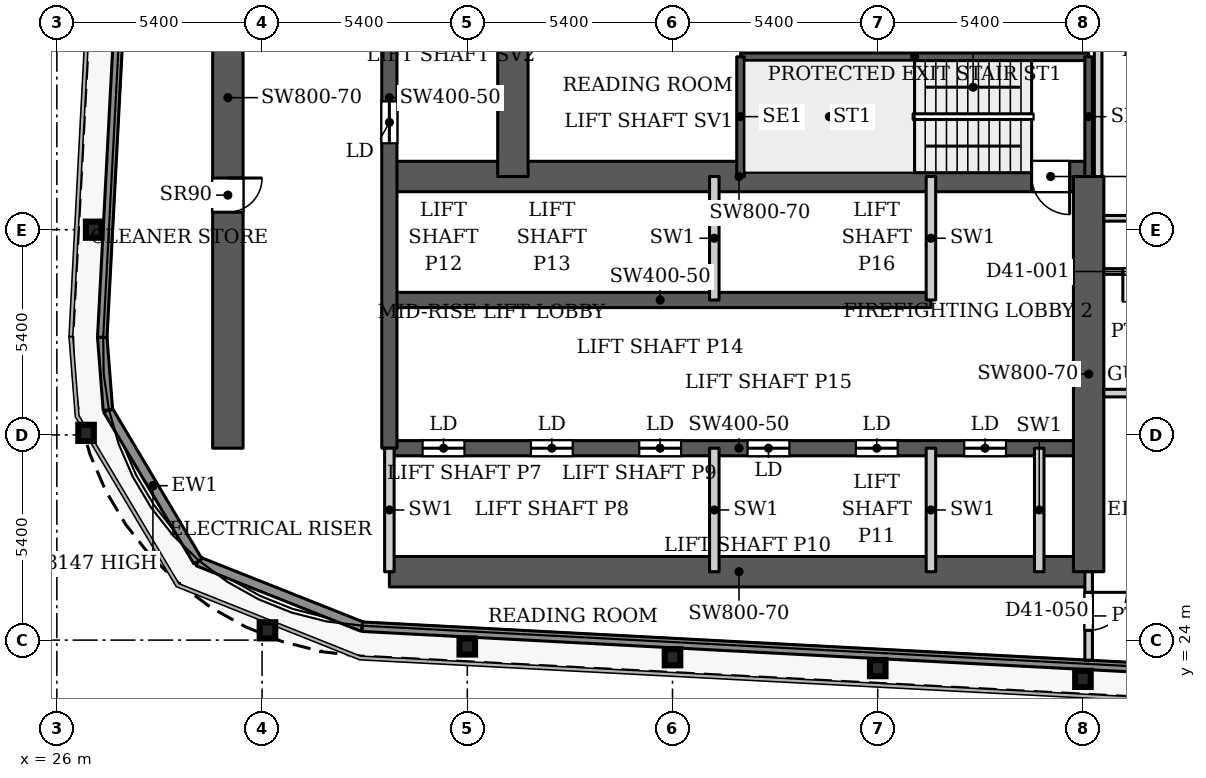
"""IFC4 building model, lengths in metres.
Left out: names, types, materials, properties, quantities, classifications, styles, units other than length and angle.
Written with IfcOpenShell. Run it as: python <this file> out.ifc"""

import sys

from ifc_helpers import new_model, si_unit, direction, frame, frame_2d, origin, origin_2d, place, context, subcontext, project, spatial, rectangle, i_section, extrude, source, transform, mapped, element, fill, save


model = new_model("IFC4")
c1 = context("Model", 3, precision=1e-05, world=origin(), true_north=direction((0.0, 1.0)))
c2 = subcontext(c1, "Body", "Model", "MODEL_VIEW")
j1 = project(units=[si_unit("LENGTHUNIT", "METRE"), si_unit("PLANEANGLEUNIT", "RADIAN")], contexts=[c1])
p1 = place(None, origin())
s1 = spatial("IfcSite", under=j1, at=p1, CompositionType="ELEMENT")
p2 = place(p1, origin())
s2 = spatial("IfcBuilding", under=s1, at=p2, CompositionType="ELEMENT")
p3 = place(p2, frame((0.0, 0.0, 179.9)))
s3 = spatial("IfcBuildingStorey", under=s2, at=p3, CompositionType="ELEMENT", Elevation=179.9)
for number, where, z_axis, x_axis in (
    (1, (53.0, 22.98, 0.0), (0.0, 0.0, 1.0), (1.0, 0.0, 0.0)),
    (2, (47.6, 23.264, 0.0), (0.0, 0.0, 1.0), (1.0, 0.0, 0.0)),
    (3, (42.2, 23.548, 0.0), (0.0, 0.0, 1.0), (1.0, 0.0, 0.0)),
    (4, (36.8, 23.832, 0.0), (0.0, 0.0, 1.0), (1.0, 0.0, 0.0)),
    (5, (31.542, 24.257, 0.0), (0.0, 0.0, 1.0), (1.0, 0.0, 0.0)),
    (6, (26.769, 29.454, 0.0), (0.0, 0.0, 1.0), (1.0, 0.0, 0.0)),
    (7, (26.969, 34.8, 0.0), (0.0, 0.0, 1.0), (1.0, 0.0, 0.0)),
):
    element("IfcColumn", number, at=place(p3, frame(where, z_axis=z_axis, x_axis=x_axis)), inside=s3, PredefinedType="COLUMN", context=c2, shape_type="SweptSolid", body=[
        extrude(i_section(OverallWidth=0.409, OverallDepth=0.425, WebThickness=0.033, FlangeThickness=0.052, FilletRadius=0.013, at=origin_2d()), origin(), (0.0, 0.0, 1.0), 3.9),
    ])
p4 = place(p3, frame((34.75, 25.8, 0.0), z_axis=(0.0, 0.0, 1.0), x_axis=(1.0, 0.0, 0.0)))
e8 = element("IfcWall", 8, at=p4, inside=s3, PredefinedType="SHEAR", context=c2, shape_type="SweptSolid", body=[
    extrude(rectangle(XDim=18.4, YDim=0.8, at=frame_2d((9.2, 0.0))), origin(), (0.0, 0.0, 1.0), 3.9),
])
p5 = place(p3, frame((34.75, 29.05, 0.0), z_axis=(0.0, 0.0, 1.0), x_axis=(1.0, 0.0, 0.0)))
e9 = element("IfcWall", 9, at=p5, inside=s3, PredefinedType="SHEAR", context=c2, shape_type="SweptSolid", body=[
    extrude(rectangle(XDim=18.4, YDim=0.4, at=frame_2d((9.2, 0.0))), origin(), (0.0, 0.0, 1.0), 3.9),
])
p6 = place(p5, frame((0.875, 0.0, 0.0)))
e10 = element("IfcOpeningElement", 10, at=p6, cuts=e9, PredefinedType="OPENING", context=c2, shape_type="SweptSolid", body=[
    extrude(rectangle(XDim=1.1, YDim=2.2, at=frame_2d((0.55, 1.1))), frame((0.0, 0.21, 0.0), z_axis=(0.0, -1.0, 0.0), x_axis=(1.0, 0.0, 0.0)), (0.0, 0.0, 1.0), 0.42),
])
p7 = place(p5, frame((3.725, 0.0, 0.0)))
e11 = element("IfcOpeningElement", 11, at=p7, cuts=e9, PredefinedType="OPENING", context=c2, shape_type="SweptSolid", body=[
    extrude(rectangle(XDim=1.1, YDim=2.2, at=frame_2d((0.55, 1.1))), frame((0.0, 0.21, 0.0), z_axis=(0.0, -1.0, 0.0), x_axis=(1.0, 0.0, 0.0)), (0.0, 0.0, 1.0), 0.42),
])
p8 = place(p5, frame((6.575, 0.0, 0.0)))
e12 = element("IfcOpeningElement", 12, at=p8, cuts=e9, PredefinedType="OPENING", context=c2, shape_type="SweptSolid", body=[
    extrude(rectangle(XDim=1.1, YDim=2.2, at=frame_2d((0.55, 1.1))), frame((0.0, 0.21, 0.0), z_axis=(0.0, -1.0, 0.0), x_axis=(1.0, 0.0, 0.0)), (0.0, 0.0, 1.0), 0.42),
])
p9 = place(p5, frame((9.425, 0.0, 0.0)))
e13 = element("IfcOpeningElement", 13, at=p9, cuts=e9, PredefinedType="OPENING", context=c2, shape_type="SweptSolid", body=[
    extrude(rectangle(XDim=1.1, YDim=2.2, at=frame_2d((0.55, 1.1))), frame((0.0, 0.21, 0.0), z_axis=(0.0, -1.0, 0.0), x_axis=(1.0, 0.0, 0.0)), (0.0, 0.0, 1.0), 0.42),
])
p10 = place(p5, frame((12.275, 0.0, 0.0)))
e14 = element("IfcOpeningElement", 14, at=p10, cuts=e9, PredefinedType="OPENING", context=c2, shape_type="SweptSolid", body=[
    extrude(rectangle(XDim=1.1, YDim=2.2, at=frame_2d((0.55, 1.1))), frame((0.0, 0.21, 0.0), z_axis=(0.0, -1.0, 0.0), x_axis=(1.0, 0.0, 0.0)), (0.0, 0.0, 1.0), 0.42),
])
p11 = place(p5, frame((15.125, 0.0, 0.0)))
e15 = element("IfcOpeningElement", 15, at=p11, cuts=e9, PredefinedType="OPENING", context=c2, shape_type="SweptSolid", body=[
    extrude(rectangle(XDim=1.1, YDim=2.2, at=frame_2d((0.55, 1.1))), frame((0.0, 0.21, 0.0), z_axis=(0.0, -1.0, 0.0), x_axis=(1.0, 0.0, 0.0)), (0.0, 0.0, 1.0), 0.42),
])
p12 = place(p3, frame((34.75, 32.95, 0.0), z_axis=(0.0, 0.0, 1.0), x_axis=(1.0, 0.0, 0.0)))
e16 = element("IfcWall", 16, at=p12, inside=s3, PredefinedType="SHEAR", context=c2, shape_type="SweptSolid", body=[
    extrude(rectangle(XDim=14.25, YDim=0.4, at=frame_2d((7.125, 0.0))), origin(), (0.0, 0.0, 1.0), 3.9),
])
p13 = place(p3, frame((34.75, 36.2, 0.0), z_axis=(0.0, 0.0, 1.0), x_axis=(1.0, 0.0, 0.0)))
e17 = element("IfcWall", 17, at=p13, inside=s3, PredefinedType="SHEAR", context=c2, shape_type="SweptSolid", body=[
    extrude(rectangle(XDim=18.4, YDim=0.8, at=frame_2d((9.2, 0.0))), origin(), (0.0, 0.0, 1.0), 3.9),
])
p14 = place(p13, frame((16.9, 0.0, 0.0)))
e18 = element("IfcOpeningElement", 18, at=p14, cuts=e17, PredefinedType="OPENING", context=c2, shape_type="SweptSolid", body=[
    extrude(rectangle(XDim=1.0, YDim=2.2, at=frame_2d((0.5, 1.1))), frame((0.0, 0.41, 0.0), z_axis=(0.0, -1.0, 0.0), x_axis=(1.0, 0.0, 0.0)), (0.0, 0.0, 1.0), 0.82),
])
p15 = place(p3, frame((34.75, 29.05, 0.0), z_axis=(0.0, 0.0, 1.0), x_axis=(0.0, 1.0, 0.0)))
e19 = element("IfcWall", 19, at=p15, inside=s3, PredefinedType="SHEAR", context=c2, shape_type="SweptSolid", body=[
    extrude(rectangle(XDim=18.45, YDim=0.4, at=frame_2d((9.225, 0.0))), origin(), (0.0, 0.0, 1.0), 3.9),
])
p16 = place(p15, frame((8.025, 0.0, 0.0)))
e20 = element("IfcOpeningElement", 20, at=p16, cuts=e19, PredefinedType="OPENING", context=c2, shape_type="SweptSolid", body=[
    extrude(rectangle(XDim=1.1, YDim=2.2, at=frame_2d((0.55, 1.1))), frame((0.0, 0.21, 0.0), z_axis=(0.0, -1.0, 0.0), x_axis=(1.0, 0.0, 0.0)), (0.0, 0.0, 1.0), 0.42),
])
p17 = place(p15, frame((10.875, 0.0, 0.0)))
e21 = element("IfcOpeningElement", 21, at=p17, cuts=e19, PredefinedType="OPENING", context=c2, shape_type="SweptSolid", body=[
    extrude(rectangle(XDim=1.1, YDim=2.2, at=frame_2d((0.55, 1.1))), frame((0.0, 0.21, 0.0), z_axis=(0.0, -1.0, 0.0), x_axis=(1.0, 0.0, 0.0)), (0.0, 0.0, 1.0), 0.42),
])
p18 = place(p15, frame((13.725, 0.0, 0.0)))
e22 = element("IfcOpeningElement", 22, at=p18, cuts=e19, PredefinedType="OPENING", context=c2, shape_type="SweptSolid", body=[
    extrude(rectangle(XDim=1.1, YDim=2.2, at=frame_2d((0.55, 1.1))), frame((0.0, 0.21, 0.0), z_axis=(0.0, -1.0, 0.0), x_axis=(1.0, 0.0, 0.0)), (0.0, 0.0, 1.0), 0.42),
])
p19 = place(p15, frame((15.95, 0.0, 0.0)))
e23 = element("IfcOpeningElement", 23, at=p19, cuts=e19, PredefinedType="OPENING", context=c2, shape_type="SweptSolid", body=[
    extrude(rectangle(XDim=1.1, YDim=2.2, at=frame_2d((0.55, 1.1))), frame((0.0, 0.21, 0.0), z_axis=(0.0, -1.0, 0.0), x_axis=(1.0, 0.0, 0.0)), (0.0, 0.0, 1.0), 0.42),
])
p20 = place(p3, frame((38.0, 36.2, 0.0), z_axis=(0.0, 0.0, 1.0), x_axis=(0.0, 1.0, 0.0)))
e24 = element("IfcWall", 24, at=p20, inside=s3, PredefinedType="SHEAR", context=c2, shape_type="SweptSolid", body=[
    extrude(rectangle(XDim=8.55, YDim=0.8, at=frame_2d((4.275, 0.0))), origin(), (0.0, 0.0, 1.0), 3.9),
])
p21 = place(p3, frame((30.5, 29.05, 0.0), z_axis=(0.0, 0.0, 1.0), x_axis=(0.0, 1.0, 0.0)))
e25 = element("IfcWall", 25, at=p21, inside=s3, PredefinedType="SHEAR", context=c2, shape_type="SweptSolid", body=[
    extrude(rectangle(XDim=18.45, YDim=0.8, at=frame_2d((9.225, 0.0))), origin(), (0.0, 0.0, 1.0), 3.9),
])
p22 = place(p21, frame((6.21, 0.0, 0.0)))
e26 = element("IfcOpeningElement", 26, at=p22, cuts=e25, PredefinedType="OPENING", context=c2, shape_type="SweptSolid", body=[
    extrude(rectangle(XDim=0.9, YDim=2.2, at=frame_2d((0.45, 1.1))), frame((0.0, 0.41, 0.0), z_axis=(0.0, -1.0, 0.0), x_axis=(1.0, 0.0, 0.0)), (0.0, 0.0, 1.0), 0.82),
])
p23 = place(p21, frame((10.684, 0.0, 0.0)))
e27 = element("IfcOpeningElement", 27, at=p23, cuts=e25, PredefinedType="OPENING", context=c2, shape_type="SweptSolid", body=[
    extrude(rectangle(XDim=0.9, YDim=2.2, at=frame_2d((0.45, 1.1))), frame((0.0, 0.41, 0.0), z_axis=(0.0, -1.0, 0.0), x_axis=(1.0, 0.0, 0.0)), (0.0, 0.0, 1.0), 0.82),
])
p24 = place(p3, frame((53.15, 25.8, 0.0), z_axis=(0.0, 0.0, 1.0), x_axis=(0.0, 1.0, 0.0)))
e28 = element("IfcWall", 28, at=p24, inside=s3, PredefinedType="SHEAR", context=c2, shape_type="SweptSolid", body=[
    extrude(rectangle(XDim=10.4, YDim=0.8, at=frame_2d((5.2, 0.0))), origin(), (0.0, 0.0, 1.0), 3.9),
])
p25 = place(p3, frame((34.039, 24.353, 0.0), z_axis=(0.0, 0.0, 1.0), x_axis=(-0.929352825399, 0.369192803184, 0.0)))
e29 = element("IfcWall", 29, at=p25, inside=s3, PredefinedType="SOLIDWALL", context=c2, shape_type="SweptSolid", body=[
    extrude(rectangle(XDim=4.656, YDim=0.25, at=frame_2d((2.328, 0.0))), origin(), (0.0, 0.0, 1.0), 3.75),
])
p26 = place(p3, frame((29.712, 26.072, 0.0), z_axis=(0.0, 0.0, 1.0), x_axis=(-0.511028049012, 0.859564036662, 0.0)))
e30 = element("IfcWall", 30, at=p26, inside=s3, PredefinedType="SOLIDWALL", context=c2, shape_type="SweptSolid", body=[
    extrude(rectangle(XDim=4.634, YDim=0.25, at=frame_2d((2.317, 0.0))), origin(), (0.0, 0.0, 1.0), 3.147),
])
p27 = place(p3, frame((27.344, 30.055, 0.0), z_axis=(0.0, 0.0, 1.0), x_axis=(-0.077571675317, 0.99698677784, 0.0)))
e31 = element("IfcWall", 31, at=p27, inside=s3, PredefinedType="SOLIDWALL", context=c2, shape_type="SweptSolid", body=[
    extrude(rectangle(XDim=1.92, YDim=0.25, at=frame_2d((0.96, 0.0))), origin(), (0.0, 0.0, 1.0), 3.75),
])
p28 = place(p3, frame((27.195, 31.969, 0.0), z_axis=(0.0, 0.0, 1.0), x_axis=(0.052554995867, 0.998618031286, 0.0)))
e32 = element("IfcWall", 32, at=p28, inside=s3, PredefinedType="SOLIDWALL", context=c2, shape_type="SweptSolid", body=[
    extrude(rectangle(XDim=66.787, YDim=0.25, at=frame_2d((33.394, 0.0))), origin(), (0.0, 0.0, 1.0), 3.75),
])
p29 = place(p3, frame((100.586, 20.85, 0.0), z_axis=(0.0, 0.0, 1.0), x_axis=(-0.99861746497, 0.052565755559, 0.0)))
e33 = element("IfcWall", 33, at=p29, inside=s3, PredefinedType="SOLIDWALL", context=c2, shape_type="SweptSolid", body=[
    extrude(rectangle(XDim=66.639, YDim=0.25, at=frame_2d((33.319, 0.0))), origin(), (0.0, 0.0, 1.0), 3.75),
])
p30 = place(p3, frame((43.99, 39.35, 0.0), z_axis=(0.0, 0.0, 1.0), x_axis=(1.0, 0.0, 0.0)))
e34 = element("IfcWall", 34, at=p30, inside=s3, PredefinedType="SHEAR", context=c2, shape_type="SweptSolid", body=[
    extrude(rectangle(XDim=9.16, YDim=0.2, at=frame_2d((4.58, 0.0))), origin(), (0.0, 0.0, 1.0), 3.9),
])
for number, where, z_axis, x_axis in (
    (35, (43.99, 36.2, 0.0), (0.0, 0.0, 1.0), (0.0, 1.0, 0.0)),
    (36, (53.15, 36.2, 0.0), (0.0, 0.0, 1.0), (0.0, 1.0, 0.0)),
):
    element("IfcWall", number, at=place(p3, frame(where, z_axis=z_axis, x_axis=x_axis)), inside=s3, PredefinedType="SHEAR", context=c2, shape_type="SweptSolid", body=[
        extrude(rectangle(XDim=3.15, YDim=0.2, at=frame_2d((1.575, 0.0))), origin(), (0.0, 0.0, 1.0), 3.9),
    ])
for number, where, z_axis, x_axis in (
    (37, (34.75, 25.8, 0.0), (0.0, 0.0, 1.0), (0.0, 1.0, 0.0)),
    (38, (43.3, 25.8, 0.0), (0.0, 0.0, 1.0), (0.0, 1.0, 0.0)),
    (39, (43.3, 32.95, 0.0), (0.0, 0.0, 1.0), (0.0, 1.0, 0.0)),
    (40, (49.0, 25.8, 0.0), (0.0, 0.0, 1.0), (0.0, 1.0, 0.0)),
    (41, (49.0, 32.95, 0.0), (0.0, 0.0, 1.0), (0.0, 1.0, 0.0)),
    (42, (51.85, 25.8, 0.0), (0.0, 0.0, 1.0), (0.0, 1.0, 0.0)),
):
    element("IfcWall", number, at=place(p3, frame(where, z_axis=z_axis, x_axis=x_axis)), inside=s3, PredefinedType="PARTITIONING", context=c2, shape_type="SweptSolid", body=[
        extrude(rectangle(XDim=3.25, YDim=0.25, at=frame_2d((1.625, 0.0))), origin(), (0.0, 0.0, 1.0), 3.9),
    ])
p31 = place(p3, frame((53.15, 23.472, 0.0), z_axis=(0.0, 0.0, 1.0), x_axis=(0.0, 1.0, 0.0)))
e43 = element("IfcWall", 43, at=p31, inside=s3, PredefinedType="PARTITIONING", context=c2, shape_type="SweptSolid", body=[
    extrude(rectangle(XDim=2.328, YDim=0.2, at=frame_2d((1.164, 0.0))), origin(), (0.0, 0.0, 1.0), 3.6),
])
p32 = place(p31, frame((0.785, 0.0, 0.0)))
e44 = element("IfcOpeningElement", 44, at=p32, cuts=e43, PredefinedType="OPENING", context=c2, shape_type="SweptSolid", body=[
    extrude(rectangle(XDim=1.0, YDim=2.1, at=frame_2d((0.5, 1.05))), frame((0.0, 0.11, 0.0), z_axis=(0.0, -1.0, 0.0), x_axis=(1.0, 0.0, 0.0)), (0.0, 0.0, 1.0), 0.22),
])
p33 = place(p3, frame((53.4, 36.199, 0.0), z_axis=(0.0, 0.0, 1.0), x_axis=(0.0, 1.0, 0.0)))
e45 = element("IfcWall", 45, at=p33, inside=s3, PredefinedType="PARTITIONING", context=c2, shape_type="SweptSolid", body=[
    extrude(rectangle(XDim=7.701, YDim=0.2, at=frame_2d((3.851, 0.0))), origin(), (0.0, 0.0, 1.0), 3.6),
])
p34 = place(p3, frame((53.549, 30.5, 0.0), z_axis=(0.0, 0.0, 1.0), x_axis=(1.0, 0.0, 0.0)))
e46 = element("IfcWall", 46, at=p34, inside=s3, PredefinedType="PARTITIONING", context=c2, shape_type="SweptSolid", body=[
    extrude(rectangle(XDim=44.551, YDim=0.2, at=frame_2d((22.275, 0.0))), origin(), (0.0, 0.0, 1.0), 3.6),
])
p35 = place(p34, frame((6.851, 0.0, 0.0)))
e47 = element("IfcOpeningElement", 47, at=p35, cuts=e46, PredefinedType="OPENING", context=c2, shape_type="SweptSolid", body=[
    extrude(rectangle(XDim=1.0, YDim=2.1, at=frame_2d((0.5, 1.05))), frame((0.0, 0.11, 0.0), z_axis=(0.0, -1.0, 0.0), x_axis=(1.0, 0.0, 0.0)), (0.0, 0.0, 1.0), 0.22),
])
p36 = place(p34, frame((13.451, 0.0, 0.0)))
e48 = element("IfcOpeningElement", 48, at=p36, cuts=e46, PredefinedType="OPENING", context=c2, shape_type="SweptSolid", body=[
    extrude(rectangle(XDim=1.0, YDim=2.1, at=frame_2d((0.5, 1.05))), frame((0.0, 0.11, 0.0), z_axis=(0.0, -1.0, 0.0), x_axis=(1.0, 0.0, 0.0)), (0.0, 0.0, 1.0), 0.22),
])
p37 = place(p34, frame((24.701, 0.0, 0.0)))
e49 = element("IfcOpeningElement", 49, at=p37, cuts=e46, PredefinedType="OPENING", context=c2, shape_type="SweptSolid", body=[
    extrude(rectangle(XDim=1.0, YDim=2.1, at=frame_2d((0.5, 1.05))), frame((0.0, 0.11, 0.0), z_axis=(0.0, -1.0, 0.0), x_axis=(1.0, 0.0, 0.0)), (0.0, 0.0, 1.0), 0.22),
])
p38 = place(p34, frame((38.651, 0.0, 0.0)))
e50 = element("IfcOpeningElement", 50, at=p38, cuts=e46, PredefinedType="OPENING", context=c2, shape_type="SweptSolid", body=[
    extrude(rectangle(XDim=1.0, YDim=2.1, at=frame_2d((0.5, 1.05))), frame((0.0, 0.11, 0.0), z_axis=(0.0, -1.0, 0.0), x_axis=(1.0, 0.0, 0.0)), (0.0, 0.0, 1.0), 0.22),
])
p39 = place(p3, frame((53.549, 33.7, 0.0), z_axis=(0.0, 0.0, 1.0), x_axis=(1.0, 0.0, 0.0)))
e51 = element("IfcWall", 51, at=p39, inside=s3, PredefinedType="PARTITIONING", context=c2, shape_type="SweptSolid", body=[
    extrude(rectangle(XDim=6.501, YDim=0.15, at=frame_2d((3.25, 0.0))), origin(), (0.0, 0.0, 1.0), 3.6),
])
p40 = place(p39, frame((0.501, 0.0, 0.0)))
e52 = element("IfcOpeningElement", 52, at=p40, cuts=e51, PredefinedType="OPENING", context=c2, shape_type="SweptSolid", body=[
    extrude(rectangle(XDim=0.8, YDim=2.1, at=frame_2d((0.4, 1.05))), frame((0.0, 0.085, 0.0), z_axis=(0.0, -1.0, 0.0), x_axis=(1.0, 0.0, 0.0)), (0.0, 0.0, 1.0), 0.17),
])
p41 = place(p39, frame((4.501, 0.0, 0.0)))
e53 = element("IfcOpeningElement", 53, at=p41, cuts=e51, PredefinedType="OPENING", context=c2, shape_type="SweptSolid", body=[
    extrude(rectangle(XDim=0.9, YDim=2.1, at=frame_2d((0.45, 1.05))), frame((0.0, 0.085, 0.0), z_axis=(0.0, -1.0, 0.0), x_axis=(1.0, 0.0, 0.0)), (0.0, 0.0, 1.0), 0.17),
])
p42 = place(p39, frame((2.301, 0.0, 0.0)))
e54 = element("IfcOpeningElement", 54, at=p42, cuts=e51, PredefinedType="OPENING", context=c2, shape_type="SweptSolid", body=[
    extrude(rectangle(XDim=0.8, YDim=2.1, at=frame_2d((0.4, 1.05))), frame((0.0, 0.085, 0.0), z_axis=(0.0, -1.0, 0.0), x_axis=(1.0, 0.0, 0.0)), (0.0, 0.0, 1.0), 0.17),
])
p43 = place(p3, frame((53.549, 35.1, 0.0), z_axis=(0.0, 0.0, 1.0), x_axis=(1.0, 0.0, 0.0)))
e55 = element("IfcWall", 55, at=p43, inside=s3, PredefinedType="PARTITIONING", context=c2, shape_type="SweptSolid", body=[
    extrude(rectangle(XDim=9.651, YDim=0.15, at=frame_2d((4.825, 0.0))), origin(), (0.0, 0.0, 1.0), 3.6),
])
p44 = place(p43, frame((7.651, 0.0, 0.0)))
e56 = element("IfcOpeningElement", 56, at=p44, cuts=e55, PredefinedType="OPENING", context=c2, shape_type="SweptSolid", body=[
    extrude(rectangle(XDim=0.9, YDim=2.1, at=frame_2d((0.45, 1.05))), frame((0.0, 0.085, 0.0), z_axis=(0.0, -1.0, 0.0), x_axis=(1.0, 0.0, 0.0)), (0.0, 0.0, 1.0), 0.17),
])
p45 = place(p43, frame((2.651, 0.0, 0.0)))
e57 = element("IfcOpeningElement", 57, at=p45, cuts=e55, PredefinedType="OPENING", context=c2, shape_type="SweptSolid", body=[
    extrude(rectangle(XDim=1.0, YDim=2.1, at=frame_2d((0.5, 1.05))), frame((0.0, 0.085, 0.0), z_axis=(0.0, -1.0, 0.0), x_axis=(1.0, 0.0, 0.0)), (0.0, 0.0, 1.0), 0.17),
])
m1 = source(origin(), c2, "Body", "SweptSolid", [
    extrude(rectangle(XDim=1.1, YDim=2.2, at=frame_2d((0.55, 1.1))), frame((0.0, 0.025, 0.0), z_axis=(0.0, -1.0, 0.0), x_axis=(1.0, 0.0, 0.0)), (0.0, 0.0, 1.0), 0.05),
])
p46 = place(p6, origin())
e58 = element("IfcDoor", 58, at=p46, inside=s3, OperationType="SLIDING_TO_LEFT", PredefinedType="DOOR", context=c2, shape_type="MappedRepresentation", body=[
    mapped(m1, transform((0.0, 0.0, 0.0), x_axis=(1.0, 0.0, 0.0), y_axis=(0.0, 1.0, 0.0), z_axis=(0.0, 0.0, 1.0), scale=1.0)),
])
fill(e10, e58)
p47 = place(p7, origin())
e59 = element("IfcDoor", 59, at=p47, inside=s3, OperationType="SLIDING_TO_LEFT", PredefinedType="DOOR", context=c2, shape_type="MappedRepresentation", body=[
    mapped(m1, transform((0.0, 0.0, 0.0), x_axis=(1.0, 0.0, 0.0), y_axis=(0.0, 1.0, 0.0), z_axis=(0.0, 0.0, 1.0), scale=1.0)),
])
fill(e11, e59)
p48 = place(p8, origin())
e60 = element("IfcDoor", 60, at=p48, inside=s3, OperationType="SLIDING_TO_LEFT", PredefinedType="DOOR", context=c2, shape_type="MappedRepresentation", body=[
    mapped(m1, transform((0.0, 0.0, 0.0), x_axis=(1.0, 0.0, 0.0), y_axis=(0.0, 1.0, 0.0), z_axis=(0.0, 0.0, 1.0), scale=1.0)),
])
fill(e12, e60)
p49 = place(p9, origin())
e61 = element("IfcDoor", 61, at=p49, inside=s3, OperationType="SLIDING_TO_LEFT", PredefinedType="DOOR", context=c2, shape_type="MappedRepresentation", body=[
    mapped(m1, transform((0.0, 0.0, 0.0), x_axis=(1.0, 0.0, 0.0), y_axis=(0.0, 1.0, 0.0), z_axis=(0.0, 0.0, 1.0), scale=1.0)),
])
fill(e13, e61)
p50 = place(p10, origin())
e62 = element("IfcDoor", 62, at=p50, inside=s3, OperationType="SLIDING_TO_LEFT", PredefinedType="DOOR", context=c2, shape_type="MappedRepresentation", body=[
    mapped(m1, transform((0.0, 0.0, 0.0), x_axis=(1.0, 0.0, 0.0), y_axis=(0.0, 1.0, 0.0), z_axis=(0.0, 0.0, 1.0), scale=1.0)),
])
fill(e14, e62)
p51 = place(p16, origin())
e63 = element("IfcDoor", 63, at=p51, inside=s3, OperationType="SLIDING_TO_LEFT", PredefinedType="DOOR", context=c2, shape_type="MappedRepresentation", body=[
    mapped(m1, transform((0.0, 0.0, 0.0), x_axis=(1.0, 0.0, 0.0), y_axis=(0.0, 1.0, 0.0), z_axis=(0.0, 0.0, 1.0), scale=1.0)),
])
fill(e20, e63)
p52 = place(p11, origin())
e64 = element("IfcDoor", 64, at=p52, inside=s3, OperationType="SLIDING_TO_LEFT", PredefinedType="DOOR", context=c2, shape_type="MappedRepresentation", body=[
    mapped(m1, transform((0.0, 0.0, 0.0), x_axis=(1.0, 0.0, 0.0), y_axis=(0.0, 1.0, 0.0), z_axis=(0.0, 0.0, 1.0), scale=1.0)),
])
fill(e15, e64)
m2 = source(origin(), c2, "Body", "SweptSolid", [
    extrude(rectangle(XDim=0.9, YDim=2.2, at=frame_2d((0.45, 1.1))), frame((0.0, 0.025, 0.0), z_axis=(0.0, -1.0, 0.0), x_axis=(1.0, 0.0, 0.0)), (0.0, 0.0, 1.0), 0.05),
])
p53 = place(p22, origin())
e65 = element("IfcDoor", 65, at=p53, inside=s3, OperationType="SINGLE_SWING_RIGHT", PredefinedType="DOOR", context=c2, shape_type="MappedRepresentation", body=[
    mapped(m2, transform((0.0, 0.0, 0.0), x_axis=(1.0, 0.0, 0.0), y_axis=(0.0, 1.0, 0.0), z_axis=(0.0, 0.0, 1.0), scale=1.0)),
])
fill(e26, e65)
m3 = source(origin(), c2, "Body", "SweptSolid", [
    extrude(rectangle(XDim=1.0, YDim=2.2, at=frame_2d((0.5, 1.1))), frame((0.0, 0.025, 0.0), z_axis=(0.0, -1.0, 0.0), x_axis=(1.0, 0.0, 0.0)), (0.0, 0.0, 1.0), 0.05),
])
p54 = place(p14, origin())
e66 = element("IfcDoor", 66, at=p54, inside=s3, OperationType="SINGLE_SWING_RIGHT", PredefinedType="DOOR", context=c2, shape_type="MappedRepresentation", body=[
    mapped(m3, transform((0.0, 0.0, 0.0), x_axis=(1.0, 0.0, 0.0), y_axis=(0.0, 1.0, 0.0), z_axis=(0.0, 0.0, 1.0), scale=1.0)),
])
fill(e18, e66)
m4 = source(origin(), c2, "Body", "SweptSolid", [
    extrude(rectangle(XDim=0.8, YDim=2.1, at=frame_2d((0.4, 1.05))), frame((0.0, 0.025, 0.0), z_axis=(0.0, -1.0, 0.0), x_axis=(1.0, 0.0, 0.0)), (0.0, 0.0, 1.0), 0.05),
])
p55 = place(p40, origin())
e67 = element("IfcDoor", 67, at=p55, inside=s3, OperationType="SINGLE_SWING_RIGHT", PredefinedType="DOOR", context=c2, shape_type="MappedRepresentation", body=[
    mapped(m4, transform((0.0, 0.0, 0.0), x_axis=(1.0, 0.0, 0.0), y_axis=(0.0, 1.0, 0.0), z_axis=(0.0, 0.0, 1.0), scale=1.0)),
])
fill(e52, e67)
m5 = source(origin(), c2, "Body", "SweptSolid", [
    extrude(rectangle(XDim=1.0, YDim=2.1, at=frame_2d((0.5, 1.05))), frame((0.0, 0.025, 0.0), z_axis=(0.0, -1.0, 0.0), x_axis=(1.0, 0.0, 0.0)), (0.0, 0.0, 1.0), 0.05),
])
p56 = place(p32, origin())
e68 = element("IfcDoor", 68, at=p56, inside=s3, OperationType="SINGLE_SWING_RIGHT", PredefinedType="DOOR", context=c2, shape_type="MappedRepresentation", body=[
    mapped(m5, transform((0.0, 0.0, 0.0), x_axis=(1.0, 0.0, 0.0), y_axis=(0.0, 1.0, 0.0), z_axis=(0.0, 0.0, 1.0), scale=1.0)),
])
fill(e44, e68)
save(model, sys.argv[1])
